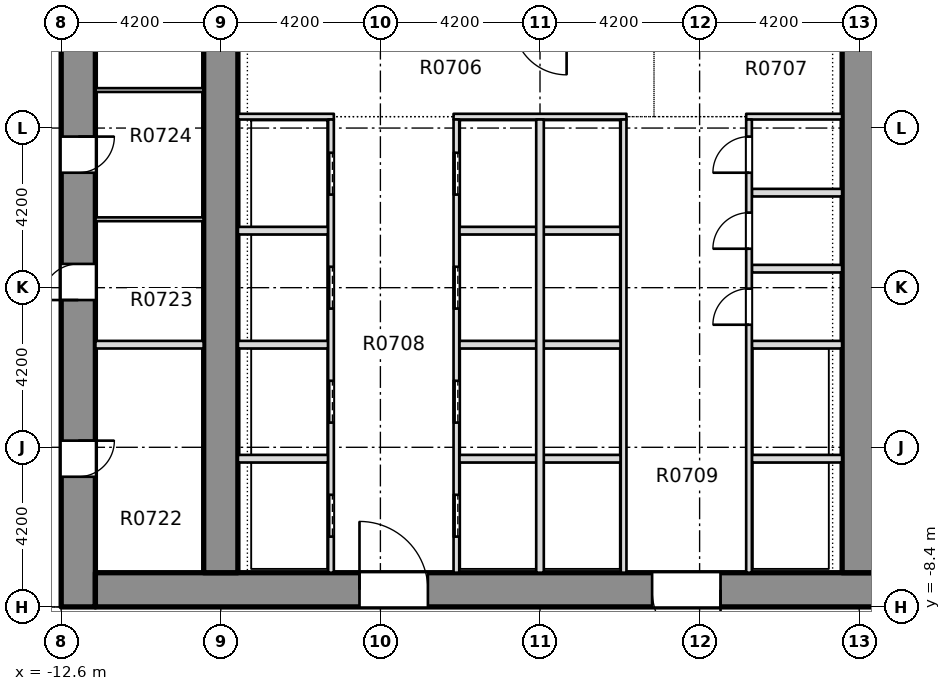
"""IFC4 building model, lengths in metres.
Left out: names, types, materials, properties, quantities, classifications, styles, units other than length and angle.
Written with IfcOpenShell. Run it as: python <this file> out.ifc"""

import sys

from ifc_helpers import new_model, si_unit, direction, frame, frame_2d, origin, place, context, subcontext, project, spatial, rectangle, extrude, element, fill, save


model = new_model("IFC4")
c1 = context("Model", 3, precision=1e-05, world=origin(), true_north=direction((0.0, 1.0)))
c2 = subcontext(c1, "Body", "Model", "MODEL_VIEW")
j1 = project(units=[si_unit("LENGTHUNIT", "METRE"), si_unit("PLANEANGLEUNIT", "RADIAN")], contexts=[c1])
p1 = place(None, origin())
s1 = spatial("IfcSite", under=j1, at=p1, CompositionType="ELEMENT")
p2 = place(p1, origin())
s2 = spatial("IfcBuilding", under=s1, at=p2, CompositionType="ELEMENT")
p3 = place(p2, frame((0.0, 0.0, 37.95)))
s3 = spatial("IfcBuildingStorey", under=s2, at=p3, CompositionType="ELEMENT", Elevation=37.95)
p4 = place(p3, frame((-12.15, -8.4, -0.32), z_axis=(0.0, 0.0, 1.0), x_axis=(0.0, 1.0, 0.0)))
e1 = element("IfcWall", 1, at=p4, inside=s3, PredefinedType="SHEAR", context=c2, shape_type="SweptSolid", body=[
    extrude(rectangle(XDim=30.15, YDim=0.9, at=frame_2d((15.075, 0.0))), origin(), (0.0, 0.0, 1.0), 3.45),
])
p5 = place(p4, frame((3.425, 0.0, 0.32)))
e2 = element("IfcOpeningElement", 2, at=p5, cuts=e1, PredefinedType="OPENING", context=c2, shape_type="SweptSolid", body=[
    extrude(rectangle(XDim=0.95, YDim=2.1, at=frame_2d((0.475, 1.05))), frame((0.0, 0.46, 0.0), z_axis=(0.0, -1.0, 0.0), x_axis=(1.0, 0.0, 0.0)), (0.0, 0.0, 1.0), 0.92),
])
p6 = place(p4, frame((8.075, 0.0, 0.32)))
e3 = element("IfcOpeningElement", 3, at=p6, cuts=e1, PredefinedType="OPENING", context=c2, shape_type="SweptSolid", body=[
    extrude(rectangle(XDim=0.95, YDim=2.1, at=frame_2d((0.475, 1.05))), frame((0.0, 0.46, 0.0), z_axis=(0.0, -1.0, 0.0), x_axis=(1.0, 0.0, 0.0)), (0.0, 0.0, 1.0), 0.92),
])
p7 = place(p4, frame((11.425, 0.0, 0.32)))
e4 = element("IfcOpeningElement", 4, at=p7, cuts=e1, PredefinedType="OPENING", context=c2, shape_type="SweptSolid", body=[
    extrude(rectangle(XDim=0.95, YDim=2.1, at=frame_2d((0.475, 1.05))), frame((0.0, 0.46, 0.0), z_axis=(0.0, -1.0, 0.0), x_axis=(1.0, 0.0, 0.0)), (0.0, 0.0, 1.0), 0.92),
])
p8 = place(p4, frame((15.625, 0.0, 0.32)))
e5 = element("IfcOpeningElement", 5, at=p8, cuts=e1, PredefinedType="OPENING", context=c2, shape_type="SweptSolid", body=[
    extrude(rectangle(XDim=0.95, YDim=2.1, at=frame_2d((0.475, 1.05))), frame((0.0, 0.46, 0.0), z_axis=(0.0, -1.0, 0.0), x_axis=(1.0, 0.0, 0.0)), (0.0, 0.0, 1.0), 0.92),
])
p9 = place(p4, frame((22.725, 0.0, 0.32)))
e6 = element("IfcOpeningElement", 6, at=p9, cuts=e1, PredefinedType="OPENING", context=c2, shape_type="SweptSolid", body=[
    extrude(rectangle(XDim=0.95, YDim=2.1, at=frame_2d((0.475, 1.05))), frame((0.0, 0.46, 0.0), z_axis=(0.0, -1.0, 0.0), x_axis=(1.0, 0.0, 0.0)), (0.0, 0.0, 1.0), 0.92),
])
p10 = place(p4, frame((26.75, 0.0, 0.32)))
e7 = element("IfcOpeningElement", 7, at=p10, cuts=e1, PredefinedType="OPENING", context=c2, shape_type="SweptSolid", body=[
    extrude(rectangle(XDim=0.95, YDim=2.1, at=frame_2d((0.475, 1.05))), frame((0.0, 0.46, 0.0), z_axis=(0.0, -1.0, 0.0), x_axis=(1.0, 0.0, 0.0)), (0.0, 0.0, 1.0), 0.92),
])
p11 = place(p4, frame((19.3, 0.0, 0.32)))
e8 = element("IfcOpeningElement", 8, at=p11, cuts=e1, PredefinedType="OPENING", context=c2, shape_type="SweptSolid", body=[
    extrude(rectangle(XDim=1.2, YDim=2.1, at=frame_2d((0.6, 1.05))), frame((0.0, 0.46, 0.0), z_axis=(0.0, -1.0, 0.0), x_axis=(1.0, 0.0, 0.0)), (0.0, 0.0, 1.0), 0.92),
])
p12 = place(p3, frame((-11.7, -7.95, -0.32), z_axis=(0.0, 0.0, 1.0), x_axis=(1.0, 0.0, 0.0)))
e9 = element("IfcWall", 9, at=p12, inside=s3, PredefinedType="SHEAR", context=c2, shape_type="SweptSolid", body=[
    extrude(rectangle(XDim=23.4, YDim=0.9, at=frame_2d((11.7, 0.0))), origin(), (0.0, 0.0, 1.0), 3.45),
])
p13 = place(p12, frame((6.95, 0.0, 0.32)))
e10 = element("IfcOpeningElement", 10, at=p13, cuts=e9, PredefinedType="OPENING", context=c2, shape_type="SweptSolid", body=[
    extrude(rectangle(XDim=1.8, YDim=2.1, at=frame_2d((0.9, 1.05))), frame((0.0, 0.46, 0.0), z_axis=(0.0, -1.0, 0.0), x_axis=(1.0, 0.0, 0.0)), (0.0, 0.0, 1.0), 0.92),
])
p14 = place(p12, frame((14.65, 0.0, 0.32)))
e11 = element("IfcOpeningElement", 11, at=p14, cuts=e9, PredefinedType="OPENING", context=c2, shape_type="SweptSolid", body=[
    extrude(rectangle(XDim=1.8, YDim=2.1, at=frame_2d((0.9, 1.05))), frame((0.0, 0.46, 0.0), z_axis=(0.0, -1.0, 0.0), x_axis=(1.0, 0.0, 0.0)), (0.0, 0.0, 1.0), 0.92),
])
p15 = place(p3, frame((-8.4, -7.5, -0.32), z_axis=(0.0, 0.0, 1.0), x_axis=(0.0, 1.0, 0.0)))
e12 = element("IfcWall", 12, at=p15, inside=s3, PredefinedType="SHEAR", context=c2, shape_type="SweptSolid", body=[
    extrude(rectangle(XDim=28.35, YDim=0.9, at=frame_2d((14.175, 0.0))), origin(), (0.0, 0.0, 1.0), 3.45),
])
p16 = place(p15, frame((18.4, 0.0, 0.32)))
e13 = element("IfcOpeningElement", 13, at=p16, cuts=e12, PredefinedType="OPENING", context=c2, shape_type="SweptSolid", body=[
    extrude(rectangle(XDim=1.2, YDim=2.1, at=frame_2d((0.6, 1.05))), frame((0.0, 0.46, 0.0), z_axis=(0.0, -1.0, 0.0), x_axis=(1.0, 0.0, 0.0)), (0.0, 0.0, 1.0), 0.92),
])
p17 = place(p3, frame((8.4, -7.5, -0.32), z_axis=(0.0, 0.0, 1.0), x_axis=(0.0, 1.0, 0.0)))
e14 = element("IfcWall", 14, at=p17, inside=s3, PredefinedType="SHEAR", context=c2, shape_type="SweptSolid", body=[
    extrude(rectangle(XDim=28.35, YDim=0.9, at=frame_2d((14.175, 0.0))), origin(), (0.0, 0.0, 1.0), 3.45),
])
p18 = place(p17, frame((18.4, 0.0, 0.32)))
e15 = element("IfcOpeningElement", 15, at=p18, cuts=e14, PredefinedType="OPENING", context=c2, shape_type="SweptSolid", body=[
    extrude(rectangle(XDim=1.2, YDim=2.1, at=frame_2d((0.6, 1.05))), frame((0.0, 0.46, 0.0), z_axis=(0.0, -1.0, 0.0), x_axis=(1.0, 0.0, 0.0)), (0.0, 0.0, 1.0), 0.92),
])
p19 = place(p3, frame((-7.949, -4.5, 0.0), z_axis=(0.0, 0.0, 1.0), x_axis=(1.0, 0.0, 0.0)))
e16 = element("IfcWall", 16, at=p19, inside=s3, PredefinedType="PARTITIONING", context=c2, shape_type="SweptSolid", body=[
    extrude(rectangle(XDim=2.374, YDim=0.2, at=frame_2d((1.187, 0.0))), origin(), (0.0, 0.0, 1.0), 3.13),
])
p20 = place(p3, frame((-2.125, -4.5, 0.0), z_axis=(0.0, 0.0, 1.0), x_axis=(1.0, 0.0, 0.0)))
e17 = element("IfcWall", 17, at=p20, inside=s3, PredefinedType="PARTITIONING", context=c2, shape_type="SweptSolid", body=[
    extrude(rectangle(XDim=4.25, YDim=0.2, at=frame_2d((2.125, 0.0))), origin(), (0.0, 0.0, 1.0), 3.13),
])
for number, where, z_axis, x_axis in (
    (18, (5.575, -4.5, 0.0), (0.0, 0.0, 1.0), (1.0, 0.0, 0.0)),
    (19, (-7.949, -1.5, 0.0), (0.0, 0.0, 1.0), (1.0, 0.0, 0.0)),
):
    element("IfcWall", number, at=place(p3, frame(where, z_axis=z_axis, x_axis=x_axis)), inside=s3, PredefinedType="PARTITIONING", context=c2, shape_type="SweptSolid", body=[
        extrude(rectangle(XDim=2.374, YDim=0.2, at=frame_2d((1.187, 0.0))), origin(), (0.0, 0.0, 1.0), 3.13),
    ])
p21 = place(p3, frame((-2.125, -1.5, 0.0), z_axis=(0.0, 0.0, 1.0), x_axis=(1.0, 0.0, 0.0)))
e20 = element("IfcWall", 20, at=p21, inside=s3, PredefinedType="PARTITIONING", context=c2, shape_type="SweptSolid", body=[
    extrude(rectangle(XDim=4.25, YDim=0.2, at=frame_2d((2.125, 0.0))), origin(), (0.0, 0.0, 1.0), 3.13),
])
for number, where, z_axis, x_axis in (
    (21, (5.575, -1.5, 0.0), (0.0, 0.0, 1.0), (1.0, 0.0, 0.0)),
    (22, (5.575, 0.5, 0.0), (0.0, 0.0, 1.0), (1.0, 0.0, 0.0)),
    (23, (-7.949, 1.5, 0.0), (0.0, 0.0, 1.0), (1.0, 0.0, 0.0)),
):
    element("IfcWall", number, at=place(p3, frame(where, z_axis=z_axis, x_axis=x_axis)), inside=s3, PredefinedType="PARTITIONING", context=c2, shape_type="SweptSolid", body=[
        extrude(rectangle(XDim=2.374, YDim=0.2, at=frame_2d((1.187, 0.0))), origin(), (0.0, 0.0, 1.0), 3.13),
    ])
p22 = place(p3, frame((-2.125, 1.5, 0.0), z_axis=(0.0, 0.0, 1.0), x_axis=(1.0, 0.0, 0.0)))
e24 = element("IfcWall", 24, at=p22, inside=s3, PredefinedType="PARTITIONING", context=c2, shape_type="SweptSolid", body=[
    extrude(rectangle(XDim=4.25, YDim=0.2, at=frame_2d((2.125, 0.0))), origin(), (0.0, 0.0, 1.0), 3.13),
])
p23 = place(p3, frame((5.575, 2.5, 0.0), z_axis=(0.0, 0.0, 1.0), x_axis=(1.0, 0.0, 0.0)))
e25 = element("IfcWall", 25, at=p23, inside=s3, PredefinedType="PARTITIONING", context=c2, shape_type="SweptSolid", body=[
    extrude(rectangle(XDim=2.374, YDim=0.2, at=frame_2d((1.187, 0.0))), origin(), (0.0, 0.0, 1.0), 3.13),
])
p24 = place(p3, frame((-7.949, 4.5, 0.0), z_axis=(0.0, 0.0, 1.0), x_axis=(1.0, 0.0, 0.0)))
e26 = element("IfcWall", 26, at=p24, inside=s3, PredefinedType="PARTITIONING", context=c2, shape_type="SweptSolid", body=[
    extrude(rectangle(XDim=2.524, YDim=0.15, at=frame_2d((1.262, 0.0))), origin(), (0.0, 0.0, 1.0), 3.13),
])
p25 = place(p3, frame((-2.275, 4.5, 0.0), z_axis=(0.0, 0.0, 1.0), x_axis=(1.0, 0.0, 0.0)))
e27 = element("IfcWall", 27, at=p25, inside=s3, PredefinedType="PARTITIONING", context=c2, shape_type="SweptSolid", body=[
    extrude(rectangle(XDim=4.55, YDim=0.15, at=frame_2d((2.275, 0.0))), origin(), (0.0, 0.0, 1.0), 3.13),
])
p26 = place(p3, frame((5.425, 4.5, 0.0), z_axis=(0.0, 0.0, 1.0), x_axis=(1.0, 0.0, 0.0)))
e28 = element("IfcWall", 28, at=p26, inside=s3, PredefinedType="PARTITIONING", context=c2, shape_type="SweptSolid", body=[
    extrude(rectangle(XDim=2.524, YDim=0.15, at=frame_2d((1.262, 0.0))), origin(), (0.0, 0.0, 1.0), 3.13),
])
p27 = place(p3, frame((-5.5, -7.499, 0.0), z_axis=(0.0, 0.0, 1.0), x_axis=(0.0, 1.0, 0.0)))
e29 = element("IfcWall", 29, at=p27, inside=s3, PredefinedType="PARTITIONING", context=c2, shape_type="SweptSolid", body=[
    extrude(rectangle(XDim=11.924, YDim=0.15, at=frame_2d((5.962, 0.0))), origin(), (0.0, 0.0, 1.0), 3.13),
])
p28 = place(p27, frame((0.949, 0.0, 0.0)))
e30 = element("IfcOpeningElement", 30, at=p28, cuts=e29, PredefinedType="OPENING", context=c2, shape_type="SweptSolid", body=[
    extrude(rectangle(XDim=1.1, YDim=2.1, at=frame_2d((0.55, 1.05))), frame((0.0, 0.085, 0.0), z_axis=(0.0, -1.0, 0.0), x_axis=(1.0, 0.0, 0.0)), (0.0, 0.0, 1.0), 0.17),
])
p29 = place(p27, frame((3.949, 0.0, 0.0)))
e31 = element("IfcOpeningElement", 31, at=p29, cuts=e29, PredefinedType="OPENING", context=c2, shape_type="SweptSolid", body=[
    extrude(rectangle(XDim=1.1, YDim=2.1, at=frame_2d((0.55, 1.05))), frame((0.0, 0.085, 0.0), z_axis=(0.0, -1.0, 0.0), x_axis=(1.0, 0.0, 0.0)), (0.0, 0.0, 1.0), 0.17),
])
p30 = place(p27, frame((6.949, 0.0, 0.0)))
e32 = element("IfcOpeningElement", 32, at=p30, cuts=e29, PredefinedType="OPENING", context=c2, shape_type="SweptSolid", body=[
    extrude(rectangle(XDim=1.1, YDim=2.1, at=frame_2d((0.55, 1.05))), frame((0.0, 0.085, 0.0), z_axis=(0.0, -1.0, 0.0), x_axis=(1.0, 0.0, 0.0)), (0.0, 0.0, 1.0), 0.17),
])
p31 = place(p27, frame((9.949, 0.0, 0.0)))
e33 = element("IfcOpeningElement", 33, at=p31, cuts=e29, PredefinedType="OPENING", context=c2, shape_type="SweptSolid", body=[
    extrude(rectangle(XDim=1.1, YDim=2.1, at=frame_2d((0.55, 1.05))), frame((0.0, 0.085, 0.0), z_axis=(0.0, -1.0, 0.0), x_axis=(1.0, 0.0, 0.0)), (0.0, 0.0, 1.0), 0.17),
])
p32 = place(p3, frame((-2.2, -7.499, 0.0), z_axis=(0.0, 0.0, 1.0), x_axis=(0.0, 1.0, 0.0)))
e34 = element("IfcWall", 34, at=p32, inside=s3, PredefinedType="PARTITIONING", context=c2, shape_type="SweptSolid", body=[
    extrude(rectangle(XDim=11.924, YDim=0.15, at=frame_2d((5.962, 0.0))), origin(), (0.0, 0.0, 1.0), 3.13),
])
p33 = place(p32, frame((0.949, 0.0, 0.0)))
e35 = element("IfcOpeningElement", 35, at=p33, cuts=e34, PredefinedType="OPENING", context=c2, shape_type="SweptSolid", body=[
    extrude(rectangle(XDim=1.1, YDim=2.1, at=frame_2d((0.55, 1.05))), frame((0.0, 0.085, 0.0), z_axis=(0.0, -1.0, 0.0), x_axis=(1.0, 0.0, 0.0)), (0.0, 0.0, 1.0), 0.17),
])
p34 = place(p32, frame((3.949, 0.0, 0.0)))
e36 = element("IfcOpeningElement", 36, at=p34, cuts=e34, PredefinedType="OPENING", context=c2, shape_type="SweptSolid", body=[
    extrude(rectangle(XDim=1.1, YDim=2.1, at=frame_2d((0.55, 1.05))), frame((0.0, 0.085, 0.0), z_axis=(0.0, -1.0, 0.0), x_axis=(1.0, 0.0, 0.0)), (0.0, 0.0, 1.0), 0.17),
])
p35 = place(p32, frame((6.949, 0.0, 0.0)))
e37 = element("IfcOpeningElement", 37, at=p35, cuts=e34, PredefinedType="OPENING", context=c2, shape_type="SweptSolid", body=[
    extrude(rectangle(XDim=1.1, YDim=2.1, at=frame_2d((0.55, 1.05))), frame((0.0, 0.085, 0.0), z_axis=(0.0, -1.0, 0.0), x_axis=(1.0, 0.0, 0.0)), (0.0, 0.0, 1.0), 0.17),
])
p36 = place(p32, frame((9.949, 0.0, 0.0)))
e38 = element("IfcOpeningElement", 38, at=p36, cuts=e34, PredefinedType="OPENING", context=c2, shape_type="SweptSolid", body=[
    extrude(rectangle(XDim=1.1, YDim=2.1, at=frame_2d((0.55, 1.05))), frame((0.0, 0.085, 0.0), z_axis=(0.0, -1.0, 0.0), x_axis=(1.0, 0.0, 0.0)), (0.0, 0.0, 1.0), 0.17),
])
p37 = place(p3, frame((0.0, -7.499, 0.0), z_axis=(0.0, 0.0, 1.0), x_axis=(0.0, 1.0, 0.0)))
e39 = element("IfcWall", 39, at=p37, inside=s3, PredefinedType="PARTITIONING", context=c2, shape_type="SweptSolid", body=[
    extrude(rectangle(XDim=11.924, YDim=0.2, at=frame_2d((5.962, 0.0))), origin(), (0.0, 0.0, 1.0), 3.13),
])
p38 = place(p3, frame((2.2, -7.499, 0.0), z_axis=(0.0, 0.0, 1.0), x_axis=(0.0, 1.0, 0.0)))
e40 = element("IfcWall", 40, at=p38, inside=s3, PredefinedType="PARTITIONING", context=c2, shape_type="SweptSolid", body=[
    extrude(rectangle(XDim=11.924, YDim=0.15, at=frame_2d((5.962, 0.0))), origin(), (0.0, 0.0, 1.0), 3.13),
])
p39 = place(p3, frame((5.5, -7.499, 0.0), z_axis=(0.0, 0.0, 1.0), x_axis=(0.0, 1.0, 0.0)))
e41 = element("IfcWall", 41, at=p39, inside=s3, PredefinedType="PARTITIONING", context=c2, shape_type="SweptSolid", body=[
    extrude(rectangle(XDim=11.924, YDim=0.15, at=frame_2d((5.962, 0.0))), origin(), (0.0, 0.0, 1.0), 3.13),
])
p40 = place(p39, frame((6.524, 0.0, 0.0)))
e42 = element("IfcOpeningElement", 42, at=p40, cuts=e41, PredefinedType="OPENING", context=c2, shape_type="SweptSolid", body=[
    extrude(rectangle(XDim=0.95, YDim=2.1, at=frame_2d((0.475, 1.05))), frame((0.0, 0.085, 0.0), z_axis=(0.0, -1.0, 0.0), x_axis=(1.0, 0.0, 0.0)), (0.0, 0.0, 1.0), 0.17),
])
p41 = place(p39, frame((8.524, 0.0, 0.0)))
e43 = element("IfcOpeningElement", 43, at=p41, cuts=e41, PredefinedType="OPENING", context=c2, shape_type="SweptSolid", body=[
    extrude(rectangle(XDim=0.95, YDim=2.1, at=frame_2d((0.475, 1.05))), frame((0.0, 0.085, 0.0), z_axis=(0.0, -1.0, 0.0), x_axis=(1.0, 0.0, 0.0)), (0.0, 0.0, 1.0), 0.17),
])
p42 = place(p39, frame((10.524, 0.0, 0.0)))
e44 = element("IfcOpeningElement", 44, at=p42, cuts=e41, PredefinedType="OPENING", context=c2, shape_type="SweptSolid", body=[
    extrude(rectangle(XDim=0.95, YDim=2.1, at=frame_2d((0.475, 1.05))), frame((0.0, 0.085, 0.0), z_axis=(0.0, -1.0, 0.0), x_axis=(1.0, 0.0, 0.0)), (0.0, 0.0, 1.0), 0.17),
])
p43 = place(p3, frame((-11.699, -1.5, 0.0), z_axis=(0.0, 0.0, 1.0), x_axis=(1.0, 0.0, 0.0)))
e45 = element("IfcWall", 45, at=p43, inside=s3, PredefinedType="PARTITIONING", context=c2, shape_type="SweptSolid", body=[
    extrude(rectangle(XDim=2.848, YDim=0.2, at=frame_2d((1.424, 0.0))), origin(), (0.0, 0.0, 1.0), 3.13),
])
for number, where, z_axis, x_axis in (
    (46, (-11.699, 1.8, 0.0), (0.0, 0.0, 1.0), (1.0, 0.0, 0.0)),
    (47, (-11.699, 5.2, 0.0), (0.0, 0.0, 1.0), (1.0, 0.0, 0.0)),
):
    element("IfcWall", number, at=place(p3, frame(where, z_axis=z_axis, x_axis=x_axis)), inside=s3, PredefinedType="PARTITIONING", context=c2, shape_type="SweptSolid", body=[
        extrude(rectangle(XDim=2.848, YDim=0.1, at=frame_2d((1.424, 0.0))), origin(), (0.0, 0.0, 1.0), 3.13),
    ])
p44 = place(p28, origin())
e48 = element("IfcDoor", 48, at=p44, inside=s3, OperationType="SLIDING_TO_RIGHT", PredefinedType="DOOR", context=c2, shape_type="SweptSolid", body=[
    extrude(rectangle(XDim=1.1, YDim=2.1, at=frame_2d((0.55, 1.05))), frame((0.0, 0.025, 0.0), z_axis=(0.0, -1.0, 0.0), x_axis=(1.0, 0.0, 0.0)), (0.0, 0.0, 1.0), 0.05),
])
fill(e30, e48)
p45 = place(p29, origin())
e49 = element("IfcDoor", 49, at=p45, inside=s3, OperationType="SLIDING_TO_RIGHT", PredefinedType="DOOR", context=c2, shape_type="SweptSolid", body=[
    extrude(rectangle(XDim=1.1, YDim=2.1, at=frame_2d((0.55, 1.05))), frame((0.0, 0.025, 0.0), z_axis=(0.0, -1.0, 0.0), x_axis=(1.0, 0.0, 0.0)), (0.0, 0.0, 1.0), 0.05),
])
fill(e31, e49)
p46 = place(p30, origin())
e50 = element("IfcDoor", 50, at=p46, inside=s3, OperationType="SLIDING_TO_RIGHT", PredefinedType="DOOR", context=c2, shape_type="SweptSolid", body=[
    extrude(rectangle(XDim=1.1, YDim=2.1, at=frame_2d((0.55, 1.05))), frame((0.0, 0.025, 0.0), z_axis=(0.0, -1.0, 0.0), x_axis=(1.0, 0.0, 0.0)), (0.0, 0.0, 1.0), 0.05),
])
fill(e32, e50)
p47 = place(p31, origin())
e51 = element("IfcDoor", 51, at=p47, inside=s3, OperationType="SLIDING_TO_RIGHT", PredefinedType="DOOR", context=c2, shape_type="SweptSolid", body=[
    extrude(rectangle(XDim=1.1, YDim=2.1, at=frame_2d((0.55, 1.05))), frame((0.0, 0.025, 0.0), z_axis=(0.0, -1.0, 0.0), x_axis=(1.0, 0.0, 0.0)), (0.0, 0.0, 1.0), 0.05),
])
fill(e33, e51)
p48 = place(p33, origin())
e52 = element("IfcDoor", 52, at=p48, inside=s3, OperationType="SLIDING_TO_RIGHT", PredefinedType="DOOR", context=c2, shape_type="SweptSolid", body=[
    extrude(rectangle(XDim=1.1, YDim=2.1, at=frame_2d((0.55, 1.05))), frame((0.0, 0.025, 0.0), z_axis=(0.0, -1.0, 0.0), x_axis=(1.0, 0.0, 0.0)), (0.0, 0.0, 1.0), 0.05),
])
fill(e35, e52)
p49 = place(p34, origin())
e53 = element("IfcDoor", 53, at=p49, inside=s3, OperationType="SLIDING_TO_RIGHT", PredefinedType="DOOR", context=c2, shape_type="SweptSolid", body=[
    extrude(rectangle(XDim=1.1, YDim=2.1, at=frame_2d((0.55, 1.05))), frame((0.0, 0.025, 0.0), z_axis=(0.0, -1.0, 0.0), x_axis=(1.0, 0.0, 0.0)), (0.0, 0.0, 1.0), 0.05),
])
fill(e36, e53)
p50 = place(p35, origin())
e54 = element("IfcDoor", 54, at=p50, inside=s3, OperationType="SLIDING_TO_RIGHT", PredefinedType="DOOR", context=c2, shape_type="SweptSolid", body=[
    extrude(rectangle(XDim=1.1, YDim=2.1, at=frame_2d((0.55, 1.05))), frame((0.0, 0.025, 0.0), z_axis=(0.0, -1.0, 0.0), x_axis=(1.0, 0.0, 0.0)), (0.0, 0.0, 1.0), 0.05),
])
fill(e37, e54)
p51 = place(p36, origin())
e55 = element("IfcDoor", 55, at=p51, inside=s3, OperationType="SLIDING_TO_RIGHT", PredefinedType="DOOR", context=c2, shape_type="SweptSolid", body=[
    extrude(rectangle(XDim=1.1, YDim=2.1, at=frame_2d((0.55, 1.05))), frame((0.0, 0.025, 0.0), z_axis=(0.0, -1.0, 0.0), x_axis=(1.0, 0.0, 0.0)), (0.0, 0.0, 1.0), 0.05),
])
fill(e38, e55)
p52 = place(p40, origin())
e56 = element("IfcDoor", 56, at=p52, inside=s3, OperationType="SINGLE_SWING_RIGHT", PredefinedType="DOOR", context=c2, shape_type="SweptSolid", body=[
    extrude(rectangle(XDim=0.95, YDim=2.1, at=frame_2d((0.475, 1.05))), frame((0.0, 0.025, 0.0), z_axis=(0.0, -1.0, 0.0), x_axis=(1.0, 0.0, 0.0)), (0.0, 0.0, 1.0), 0.05),
])
fill(e42, e56)
p53 = place(p41, origin())
e57 = element("IfcDoor", 57, at=p53, inside=s3, OperationType="SINGLE_SWING_LEFT", PredefinedType="DOOR", context=c2, shape_type="SweptSolid", body=[
    extrude(rectangle(XDim=0.95, YDim=2.1, at=frame_2d((0.475, 1.05))), frame((0.0, 0.025, 0.0), z_axis=(0.0, -1.0, 0.0), x_axis=(1.0, 0.0, 0.0)), (0.0, 0.0, 1.0), 0.05),
])
fill(e43, e57)
p54 = place(p42, origin())
e58 = element("IfcDoor", 58, at=p54, inside=s3, OperationType="SINGLE_SWING_RIGHT", PredefinedType="DOOR", context=c2, shape_type="SweptSolid", body=[
    extrude(rectangle(XDim=0.95, YDim=2.1, at=frame_2d((0.475, 1.05))), frame((0.0, 0.025, 0.0), z_axis=(0.0, -1.0, 0.0), x_axis=(1.0, 0.0, 0.0)), (0.0, 0.0, 1.0), 0.05),
])
fill(e44, e58)
p55 = place(p13, origin())
e59 = element("IfcDoor", 59, at=p55, inside=s3, OperationType="SINGLE_SWING_LEFT", PredefinedType="DOOR", context=c2, shape_type="SweptSolid", body=[
    extrude(rectangle(XDim=1.8, YDim=2.1, at=frame_2d((0.9, 1.05))), frame((0.0, 0.025, 0.0), z_axis=(0.0, -1.0, 0.0), x_axis=(1.0, 0.0, 0.0)), (0.0, 0.0, 1.0), 0.05),
])
fill(e10, e59)
p56 = place(p14, origin())
e60 = element("IfcDoor", 60, at=p56, inside=s3, OperationType="SINGLE_SWING_LEFT", PredefinedType="DOOR", context=c2, shape_type="SweptSolid", body=[
    extrude(rectangle(XDim=1.8, YDim=2.1, at=frame_2d((0.9, 1.05))), frame((0.0, 0.025, 0.0), z_axis=(0.0, -1.0, 0.0), x_axis=(1.0, 0.0, 0.0)), (0.0, 0.0, 1.0), 0.05),
])
fill(e11, e60)
p57 = place(p5, origin())
e61 = element("IfcDoor", 61, at=p57, inside=s3, OperationType="SINGLE_SWING_LEFT", PredefinedType="DOOR", context=c2, shape_type="SweptSolid", body=[
    extrude(rectangle(XDim=0.95, YDim=2.1, at=frame_2d((0.475, 1.05))), frame((0.0, 0.025, 0.0), z_axis=(0.0, -1.0, 0.0), x_axis=(1.0, 0.0, 0.0)), (0.0, 0.0, 1.0), 0.05),
])
fill(e2, e61)
p58 = place(p6, origin())
e62 = element("IfcDoor", 62, at=p58, inside=s3, OperationType="SINGLE_SWING_LEFT", PredefinedType="DOOR", context=c2, shape_type="SweptSolid", body=[
    extrude(rectangle(XDim=0.95, YDim=2.1, at=frame_2d((0.475, 1.05))), frame((0.0, 0.025, 0.0), z_axis=(0.0, -1.0, 0.0), x_axis=(1.0, 0.0, 0.0)), (0.0, 0.0, 1.0), 0.05),
])
fill(e3, e62)
p59 = place(p7, origin())
e63 = element("IfcDoor", 63, at=p59, inside=s3, OperationType="SINGLE_SWING_LEFT", PredefinedType="DOOR", context=c2, shape_type="SweptSolid", body=[
    extrude(rectangle(XDim=0.95, YDim=2.1, at=frame_2d((0.475, 1.05))), frame((0.0, 0.025, 0.0), z_axis=(0.0, -1.0, 0.0), x_axis=(1.0, 0.0, 0.0)), (0.0, 0.0, 1.0), 0.05),
])
fill(e4, e63)
save(model, sys.argv[1])
